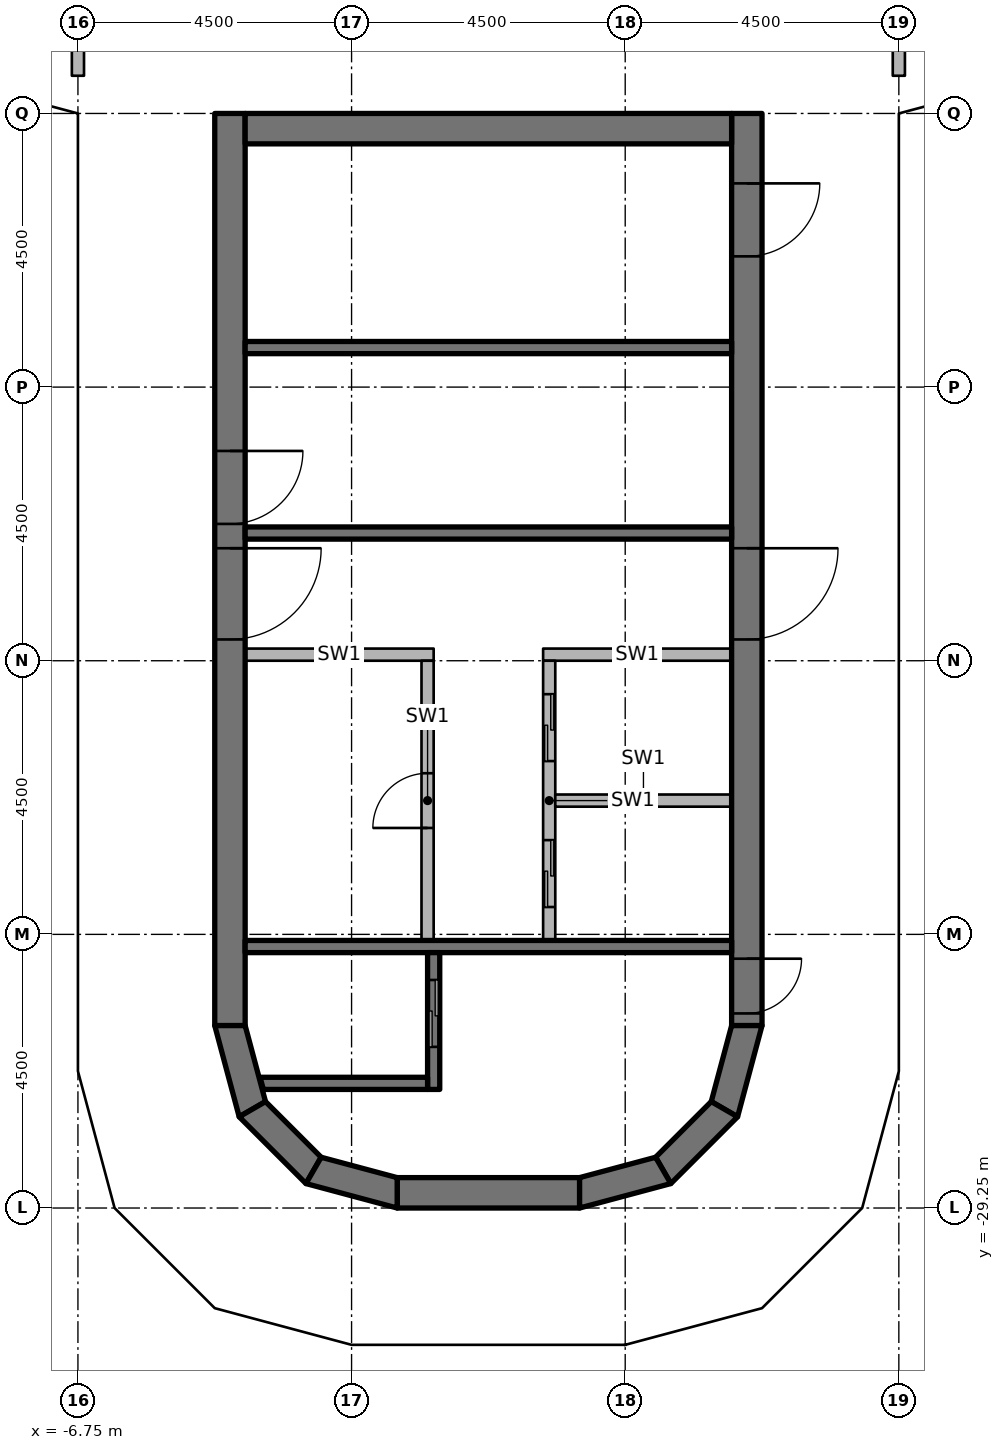
"""IFC4 building model, lengths in metres.
Left out: names, types, materials, properties, quantities, classifications, styles, units other than length and angle.
Written with IfcOpenShell. Run it as: python <this file> out.ifc"""

import sys

from ifc_helpers import new_model, si_unit, direction, frame, frame_2d, origin, origin_2d, place, context, subcontext, project, spatial, polyline, rectangle, outline, extrude, element, fill, save


model = new_model("IFC4")
c1 = context("Model", 3, precision=1e-05, world=origin(), true_north=direction((0.0, 1.0)))
c2 = subcontext(c1, "Body", "Model", "MODEL_VIEW")
j1 = project(units=[si_unit("LENGTHUNIT", "METRE"), si_unit("PLANEANGLEUNIT", "RADIAN")], contexts=[c1])
p1 = place(None, origin())
s1 = spatial("IfcSite", under=j1, at=p1, CompositionType="ELEMENT")
p2 = place(p1, origin())
s2 = spatial("IfcBuilding", under=s1, at=p2, CompositionType="ELEMENT")
p3 = place(p2, frame((0.0, 0.0, 249.8)))
s3 = spatial("IfcBuildingStorey", under=s2, at=p3, CompositionType="ELEMENT", Elevation=249.8)
for number, where, z_axis, x_axis in (
    (1, (-6.25, -26.9, 0.0), (0.0, 0.0, 1.0), (1.0, 0.0, 0.0)),
    (2, (-6.25, -24.65, 0.0), (0.0, 0.0, 1.0), (1.0, 0.0, 0.0)),
    (3, (-6.25, -20.25, 0.0), (0.0, 0.0, 1.0), (1.0, 0.0, 0.0)),
    (4, (-6.25, -15.75, 0.0), (0.0, 0.0, 1.0), (1.0, 0.0, 0.0)),
    (5, (-6.25, -10.75, 0.0), (0.0, 0.0, 1.0), (1.0, 0.0, 0.0)),
    (6, (6.25, -26.9, 0.0), (0.0, 0.0, 1.0), (1.0, 0.0, 0.0)),
    (7, (6.25, -24.65, 0.0), (0.0, 0.0, 1.0), (1.0, 0.0, 0.0)),
    (8, (6.25, -20.25, 0.0), (0.0, 0.0, 1.0), (1.0, 0.0, 0.0)),
    (9, (6.25, -15.75, 0.0), (0.0, 0.0, 1.0), (1.0, 0.0, 0.0)),
    (10, (6.25, -10.75, 0.0), (0.0, 0.0, 1.0), (1.0, 0.0, 0.0)),
):
    element("IfcColumn", number, at=place(p3, frame(where, z_axis=z_axis, x_axis=x_axis)), inside=s3, PredefinedType="COLUMN", context=c2, shape_type="SweptSolid", body=[
        extrude(rectangle(XDim=0.6, YDim=0.6, at=origin_2d()), origin(), (0.0, 0.0, 1.0), 3.65),
    ])
p4 = place(p3, frame((-4.25, -11.25, 0.0), z_axis=(0.0, 0.0, 1.0), x_axis=(0.0, -1.0, 0.0)))
e11 = element("IfcWall", 11, at=p4, inside=s3, PredefinedType="SHEAR", context=c2, shape_type="SweptSolid", body=[
    extrude(rectangle(XDim=15.0, YDim=0.5, at=frame_2d((7.5, 0.0))), origin(), (0.0, 0.0, 1.0), 3.8),
])
p5 = place(p4, frame((7.15, 0.0, 0.0)))
e12 = element("IfcOpeningElement", 12, at=p5, cuts=e11, PredefinedType="OPENING", context=c2, shape_type="SweptSolid", body=[
    extrude(rectangle(XDim=1.5, YDim=2.3, at=frame_2d((0.75, 1.15))), frame((0.0, 0.26, 0.0), z_axis=(0.0, -1.0, 0.0), x_axis=(1.0, 0.0, 0.0)), (0.0, 0.0, 1.0), 0.52),
])
p6 = place(p4, frame((5.55, 0.0, 0.0)))
e13 = element("IfcOpeningElement", 13, at=p6, cuts=e11, PredefinedType="OPENING", context=c2, shape_type="SweptSolid", body=[
    extrude(rectangle(XDim=1.2, YDim=2.1, at=frame_2d((0.6, 1.05))), frame((0.0, 0.26, 0.0), z_axis=(0.0, -1.0, 0.0), x_axis=(1.0, 0.0, 0.0)), (0.0, 0.0, 1.0), 0.52),
])
p7 = place(p3, frame((4.25, -11.25, 0.0), z_axis=(0.0, 0.0, 1.0), x_axis=(0.0, -1.0, 0.0)))
e14 = element("IfcWall", 14, at=p7, inside=s3, PredefinedType="SHEAR", context=c2, shape_type="SweptSolid", body=[
    extrude(rectangle(XDim=15.0, YDim=0.5, at=frame_2d((7.5, 0.0))), origin(), (0.0, 0.0, 1.0), 3.8),
])
p8 = place(p7, frame((7.15, 0.0, 0.0)))
e15 = element("IfcOpeningElement", 15, at=p8, cuts=e14, PredefinedType="OPENING", context=c2, shape_type="SweptSolid", body=[
    extrude(rectangle(XDim=1.5, YDim=2.3, at=frame_2d((0.75, 1.15))), frame((0.0, 0.26, 0.0), z_axis=(0.0, -1.0, 0.0), x_axis=(1.0, 0.0, 0.0)), (0.0, 0.0, 1.0), 0.52),
])
p9 = place(p7, frame((13.9, 0.0, 0.0)))
e16 = element("IfcOpeningElement", 16, at=p9, cuts=e14, PredefinedType="OPENING", context=c2, shape_type="SweptSolid", body=[
    extrude(rectangle(XDim=0.9, YDim=2.1, at=frame_2d((0.45, 1.05))), frame((0.0, 0.26, 0.0), z_axis=(0.0, -1.0, 0.0), x_axis=(1.0, 0.0, 0.0)), (0.0, 0.0, 1.0), 0.52),
])
p10 = place(p7, frame((1.15, 0.0, 0.0)))
e17 = element("IfcOpeningElement", 17, at=p10, cuts=e14, PredefinedType="OPENING", context=c2, shape_type="SweptSolid", body=[
    extrude(rectangle(XDim=1.2, YDim=2.1, at=frame_2d((0.6, 1.05))), frame((0.0, 0.26, 0.0), z_axis=(0.0, -1.0, 0.0), x_axis=(1.0, 0.0, 0.0)), (0.0, 0.0, 1.0), 0.52),
])
p11 = place(p3, frame((-4.0, -11.5, 0.0), z_axis=(0.0, 0.0, 1.0), x_axis=(1.0, 0.0, 0.0)))
e18 = element("IfcWall", 18, at=p11, inside=s3, PredefinedType="SHEAR", context=c2, shape_type="SweptSolid", body=[
    extrude(rectangle(XDim=8.0, YDim=0.5, at=frame_2d((4.0, 0.0))), origin(), (0.0, 0.0, 1.0), 3.8),
])
p12 = place(p3, frame((-1.5, -29.0, 0.0), z_axis=(0.0, 0.0, 1.0), x_axis=(1.0, 0.0, 0.0)))
e19 = element("IfcWall", 19, at=p12, inside=s3, PredefinedType="SHEAR", context=c2, shape_type="SweptSolid", body=[
    extrude(rectangle(XDim=3.0, YDim=0.5, at=frame_2d((1.5, 0.0))), origin(), (0.0, 0.0, 1.0), 3.8),
])
p13 = place(p3, origin())
e20 = element("IfcWall", 20, at=p13, inside=s3, PredefinedType="SHEAR", context=c2, shape_type="SweptSolid", body=[
    extrude(outline(polyline([(-4.5, -26.25), (-4.098, -27.75), (-3.665, -27.5), (-4.0, -26.25), (-4.5, -26.25)])), origin(), (0.0, 0.0, 1.0), 3.8),
])
p14 = place(p3, origin())
e21 = element("IfcWall", 21, at=p14, inside=s3, PredefinedType="SHEAR", context=c2, shape_type="SweptSolid", body=[
    extrude(outline(polyline([(-4.098, -27.75), (-3.0, -28.848), (-2.75, -28.415), (-3.665, -27.5), (-4.098, -27.75)])), origin(), (0.0, 0.0, 1.0), 3.8),
])
p15 = place(p3, origin())
e22 = element("IfcWall", 22, at=p15, inside=s3, PredefinedType="SHEAR", context=c2, shape_type="SweptSolid", body=[
    extrude(outline(polyline([(-3.0, -28.848), (-1.5, -29.25), (-1.5, -28.75), (-2.75, -28.415), (-3.0, -28.848)])), origin(), (0.0, 0.0, 1.0), 3.8),
])
p16 = place(p3, origin())
e23 = element("IfcWall", 23, at=p16, inside=s3, PredefinedType="SHEAR", context=c2, shape_type="SweptSolid", body=[
    extrude(outline(polyline([(4.5, -26.25), (4.098, -27.75), (3.665, -27.5), (4.0, -26.25), (4.5, -26.25)])), origin(), (0.0, 0.0, 1.0), 3.8),
])
p17 = place(p3, origin())
e24 = element("IfcWall", 24, at=p17, inside=s3, PredefinedType="SHEAR", context=c2, shape_type="SweptSolid", body=[
    extrude(outline(polyline([(4.098, -27.75), (3.0, -28.848), (2.75, -28.415), (3.665, -27.5), (4.098, -27.75)])), origin(), (0.0, 0.0, 1.0), 3.8),
])
p18 = place(p3, origin())
e25 = element("IfcWall", 25, at=p18, inside=s3, PredefinedType="SHEAR", context=c2, shape_type="SweptSolid", body=[
    extrude(outline(polyline([(3.0, -28.848), (1.5, -29.25), (1.5, -28.75), (2.75, -28.415), (3.0, -28.848)])), origin(), (0.0, 0.0, 1.0), 3.8),
])
p19 = place(p3, frame((4.0, -24.95, 0.0), z_axis=(0.0, 0.0, 1.0), x_axis=(-1.0, 0.0, 0.0)))
e26 = element("IfcWall", 26, at=p19, inside=s3, PredefinedType="SHEAR", context=c2, shape_type="SweptSolid", body=[
    extrude(rectangle(XDim=8.0, YDim=0.2, at=frame_2d((4.0, 0.0))), origin(), (0.0, 0.0, 1.0), 3.65),
])
p20 = place(p3, frame((-0.9, -27.3, 0.0), z_axis=(0.0, 0.0, 1.0), x_axis=(0.0, 1.0, 0.0)))
e27 = element("IfcWall", 27, at=p20, inside=s3, PredefinedType="SHEAR", context=c2, shape_type="SweptSolid", body=[
    extrude(rectangle(XDim=2.25, YDim=0.2, at=frame_2d((1.125, 0.0))), origin(), (0.0, 0.0, 1.0), 3.65),
])
p21 = place(p20, frame((0.7, 0.0, 0.0)))
e28 = element("IfcOpeningElement", 28, at=p21, cuts=e27, PredefinedType="OPENING", context=c2, shape_type="SweptSolid", body=[
    extrude(rectangle(XDim=1.1, YDim=2.3, at=frame_2d((0.55, 1.15))), frame((0.0, 0.11, 0.0), z_axis=(0.0, -1.0, 0.0), x_axis=(1.0, 0.0, 0.0)), (0.0, 0.0, 1.0), 0.22),
])
p22 = place(p3, origin())
e29 = element("IfcWall", 29, at=p22, inside=s3, PredefinedType="SHEAR", context=c2, shape_type="SweptSolid", body=[
    extrude(outline(polyline([(-1.0, -27.1), (-3.755, -27.1), (-3.701, -27.3), (-1.0, -27.3), (-1.0, -27.1)])), origin(), (0.0, 0.0, 1.0), 3.65),
])
for number, where, z_axis, x_axis in (
    (30, (4.0, -18.15, 0.0), (0.0, 0.0, 1.0), (-1.0, 0.0, 0.0)),
    (31, (4.0, -15.1, 0.0), (0.0, 0.0, 1.0), (-1.0, 0.0, 0.0)),
):
    element("IfcWall", number, at=place(p3, frame(where, z_axis=z_axis, x_axis=x_axis)), inside=s3, PredefinedType="SHEAR", context=c2, shape_type="SweptSolid", body=[
        extrude(rectangle(XDim=8.0, YDim=0.2, at=frame_2d((4.0, 0.0))), origin(), (0.0, 0.0, 1.0), 3.65),
    ])
p23 = place(p3, frame((4.0, -20.15, 0.0), z_axis=(0.0, 0.0, 1.0), x_axis=(-1.0, 0.0, 0.0)))
e32 = element("IfcWall", 32, at=p23, inside=s3, PredefinedType="PARTITIONING", context=c2, shape_type="SweptSolid", body=[
    extrude(rectangle(XDim=3.1, YDim=0.2, at=frame_2d((1.55, 0.0))), origin(), (0.0, 0.0, 1.0), 3.65),
])
p24 = place(p3, frame((1.0, -24.85, 0.0), z_axis=(0.0, 0.0, 1.0), x_axis=(0.0, 1.0, 0.0)))
e33 = element("IfcWall", 33, at=p24, inside=s3, PredefinedType="PARTITIONING", context=c2, shape_type="SweptSolid", body=[
    extrude(rectangle(XDim=4.6, YDim=0.2, at=frame_2d((2.3, 0.0))), origin(), (0.0, 0.0, 1.0), 3.65),
])
p25 = place(p24, frame((0.55, 0.0, 0.0)))
e34 = element("IfcOpeningElement", 34, at=p25, cuts=e33, PredefinedType="OPENING", context=c2, shape_type="SweptSolid", body=[
    extrude(rectangle(XDim=1.1, YDim=2.3, at=frame_2d((0.55, 1.15))), frame((0.0, 0.11, 0.0), z_axis=(0.0, -1.0, 0.0), x_axis=(1.0, 0.0, 0.0)), (0.0, 0.0, 1.0), 0.22),
])
p26 = place(p24, frame((2.95, 0.0, 0.0)))
e35 = element("IfcOpeningElement", 35, at=p26, cuts=e33, PredefinedType="OPENING", context=c2, shape_type="SweptSolid", body=[
    extrude(rectangle(XDim=1.1, YDim=2.3, at=frame_2d((0.55, 1.15))), frame((0.0, 0.11, 0.0), z_axis=(0.0, -1.0, 0.0), x_axis=(1.0, 0.0, 0.0)), (0.0, 0.0, 1.0), 0.22),
])
p27 = place(p3, frame((-0.9, -20.15, 0.0), z_axis=(0.0, 0.0, 1.0), x_axis=(-1.0, 0.0, 0.0)))
e36 = element("IfcWall", 36, at=p27, inside=s3, PredefinedType="PARTITIONING", context=c2, shape_type="SweptSolid", body=[
    extrude(rectangle(XDim=3.1, YDim=0.2, at=frame_2d((1.55, 0.0))), origin(), (0.0, 0.0, 1.0), 3.65),
])
p28 = place(p3, frame((-1.0, -24.85, 0.0), z_axis=(0.0, 0.0, 1.0), x_axis=(0.0, 1.0, 0.0)))
e37 = element("IfcWall", 37, at=p28, inside=s3, PredefinedType="PARTITIONING", context=c2, shape_type="SweptSolid", body=[
    extrude(rectangle(XDim=4.6, YDim=0.2, at=frame_2d((2.3, 0.0))), origin(), (0.0, 0.0, 1.0), 3.65),
])
p29 = place(p28, frame((1.85, 0.0, 0.0)))
e38 = element("IfcOpeningElement", 38, at=p29, cuts=e37, PredefinedType="OPENING", context=c2, shape_type="SweptSolid", body=[
    extrude(rectangle(XDim=0.9, YDim=2.1, at=frame_2d((0.45, 1.05))), frame((0.0, 0.11, 0.0), z_axis=(0.0, -1.0, 0.0), x_axis=(1.0, 0.0, 0.0)), (0.0, 0.0, 1.0), 0.22),
])
p30 = place(p3, frame((4.0, -22.55, 0.0), z_axis=(0.0, 0.0, 1.0), x_axis=(-1.0, 0.0, 0.0)))
e39 = element("IfcWall", 39, at=p30, inside=s3, PredefinedType="PARTITIONING", context=c2, shape_type="SweptSolid", body=[
    extrude(rectangle(XDim=2.9, YDim=0.2, at=frame_2d((1.45, 0.0))), origin(), (0.0, 0.0, 1.0), 3.65),
])
for number, where, z_axis, x_axis in (
    (40, (6.75, -10.63, 0.0), (0.0, 0.0, 1.0), (0.0, 1.0, 0.0)),
    (41, (-6.75, -10.63, 0.0), (0.0, 0.0, 1.0), (0.0, 1.0, 0.0)),
):
    element("IfcWall", number, at=place(p3, frame(where, z_axis=z_axis, x_axis=x_axis)), inside=s3, PredefinedType="PARTITIONING", context=c2, shape_type="SweptSolid", body=[
        extrude(rectangle(XDim=3.78, YDim=0.2, at=frame_2d((1.89, 0.0))), origin(), (0.0, 0.0, 1.0), 2.75),
    ])
p31 = place(p8, origin())
e42 = element("IfcDoor", 42, at=p31, inside=s3, OperationType="DOUBLE_DOOR_SINGLE_SWING", PredefinedType="DOOR", context=c2, shape_type="SweptSolid", body=[
    extrude(rectangle(XDim=1.5, YDim=2.3, at=frame_2d((0.75, 1.15))), frame((0.0, 0.025, 0.0), z_axis=(0.0, -1.0, 0.0), x_axis=(1.0, 0.0, 0.0)), (0.0, 0.0, 1.0), 0.05),
])
fill(e15, e42)
p32 = place(p5, origin())
e43 = element("IfcDoor", 43, at=p32, inside=s3, OperationType="DOUBLE_DOOR_SINGLE_SWING", PredefinedType="DOOR", context=c2, shape_type="SweptSolid", body=[
    extrude(rectangle(XDim=1.5, YDim=2.3, at=frame_2d((0.75, 1.15))), frame((0.0, 0.025, 0.0), z_axis=(0.0, -1.0, 0.0), x_axis=(1.0, 0.0, 0.0)), (0.0, 0.0, 1.0), 0.05),
])
fill(e12, e43)
p33 = place(p9, origin())
e44 = element("IfcDoor", 44, at=p33, inside=s3, OperationType="SINGLE_SWING_LEFT", PredefinedType="DOOR", context=c2, shape_type="SweptSolid", body=[
    extrude(rectangle(XDim=0.9, YDim=2.1, at=frame_2d((0.45, 1.05))), frame((0.0, 0.025, 0.0), z_axis=(0.0, -1.0, 0.0), x_axis=(1.0, 0.0, 0.0)), (0.0, 0.0, 1.0), 0.05),
])
fill(e16, e44)
p34 = place(p6, origin())
e45 = element("IfcDoor", 45, at=p34, inside=s3, OperationType="SINGLE_SWING_LEFT", PredefinedType="DOOR", context=c2, shape_type="SweptSolid", body=[
    extrude(rectangle(XDim=1.2, YDim=2.1, at=frame_2d((0.6, 1.05))), frame((0.0, 0.025, 0.0), z_axis=(0.0, -1.0, 0.0), x_axis=(1.0, 0.0, 0.0)), (0.0, 0.0, 1.0), 0.05),
])
fill(e13, e45)
p35 = place(p10, origin())
e46 = element("IfcDoor", 46, at=p35, inside=s3, OperationType="SINGLE_SWING_RIGHT", PredefinedType="DOOR", context=c2, shape_type="SweptSolid", body=[
    extrude(rectangle(XDim=1.2, YDim=2.1, at=frame_2d((0.6, 1.05))), frame((0.0, 0.025, 0.0), z_axis=(0.0, -1.0, 0.0), x_axis=(1.0, 0.0, 0.0)), (0.0, 0.0, 1.0), 0.05),
])
fill(e17, e46)
p36 = place(p21, origin())
e47 = element("IfcDoor", 47, at=p36, inside=s3, OperationType="DOUBLE_DOOR_SLIDING", PredefinedType="DOOR", context=c2, shape_type="SweptSolid", body=[
    extrude(rectangle(XDim=1.1, YDim=2.3, at=frame_2d((0.55, 1.15))), frame((0.0, 0.025, 0.0), z_axis=(0.0, -1.0, 0.0), x_axis=(1.0, 0.0, 0.0)), (0.0, 0.0, 1.0), 0.05),
])
fill(e28, e47)
p37 = place(p25, origin())
e48 = element("IfcDoor", 48, at=p37, inside=s3, OperationType="DOUBLE_DOOR_SLIDING", PredefinedType="DOOR", context=c2, shape_type="SweptSolid", body=[
    extrude(rectangle(XDim=1.1, YDim=2.3, at=frame_2d((0.55, 1.15))), frame((0.0, 0.025, 0.0), z_axis=(0.0, -1.0, 0.0), x_axis=(1.0, 0.0, 0.0)), (0.0, 0.0, 1.0), 0.05),
])
fill(e34, e48)
p38 = place(p26, origin())
e49 = element("IfcDoor", 49, at=p38, inside=s3, OperationType="DOUBLE_DOOR_SLIDING", PredefinedType="DOOR", context=c2, shape_type="SweptSolid", body=[
    extrude(rectangle(XDim=1.1, YDim=2.3, at=frame_2d((0.55, 1.15))), frame((0.0, 0.025, 0.0), z_axis=(0.0, -1.0, 0.0), x_axis=(1.0, 0.0, 0.0)), (0.0, 0.0, 1.0), 0.05),
])
fill(e35, e49)
p39 = place(p29, origin())
e50 = element("IfcDoor", 50, at=p39, inside=s3, OperationType="SINGLE_SWING_LEFT", PredefinedType="DOOR", context=c2, shape_type="SweptSolid", body=[
    extrude(rectangle(XDim=0.9, YDim=2.1, at=frame_2d((0.45, 1.05))), frame((0.0, 0.025, 0.0), z_axis=(0.0, -1.0, 0.0), x_axis=(1.0, 0.0, 0.0)), (0.0, 0.0, 1.0), 0.05),
])
fill(e38, e50)
save(model, sys.argv[1])
